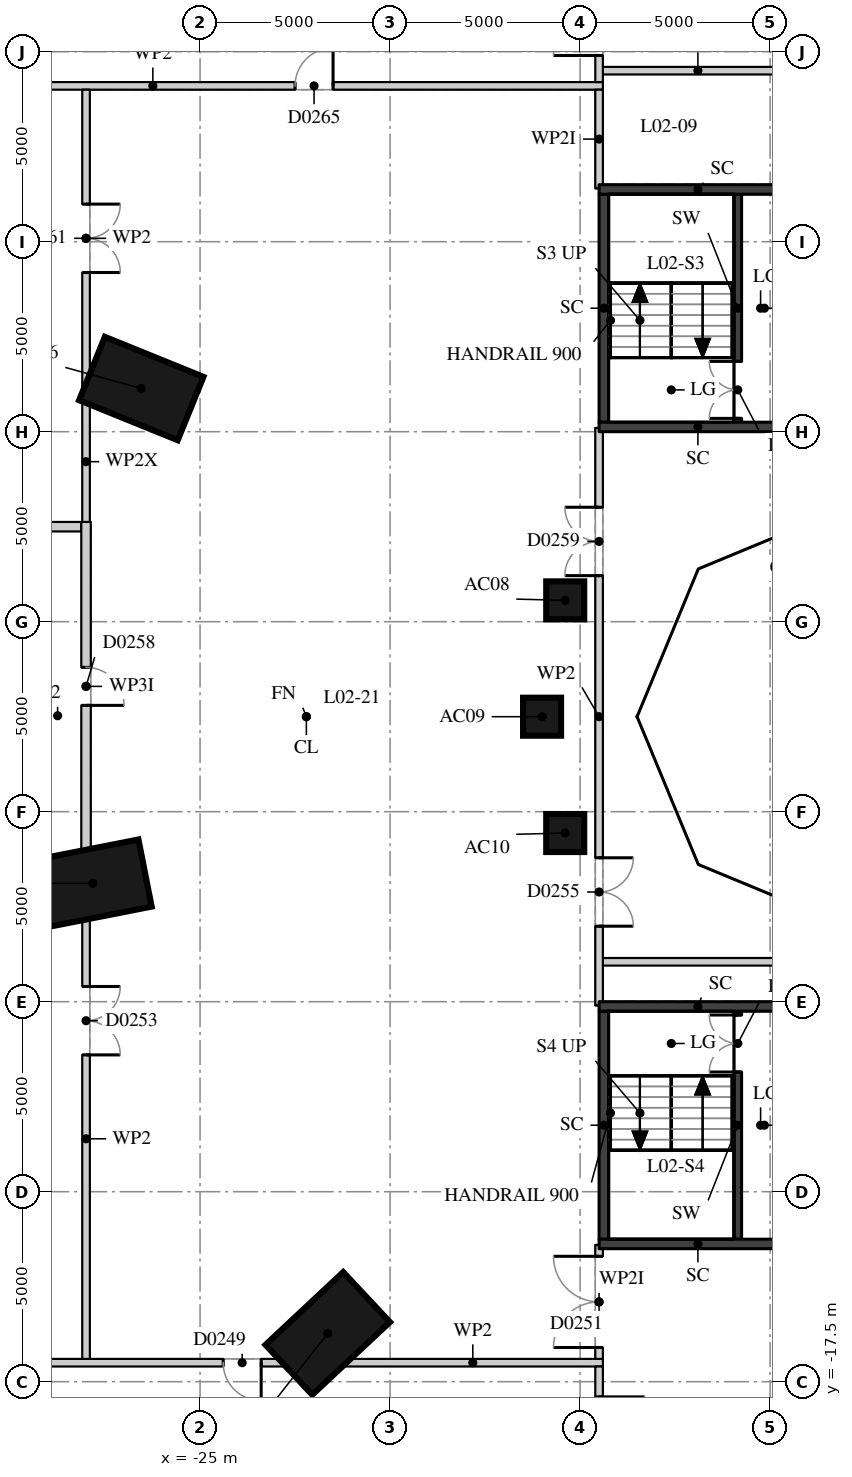
"""IFC4 building model, lengths in metres.
Left out: names, types, materials, properties, quantities, classifications, styles, units other than length and angle.
Written with IfcOpenShell. Run it as: python <this file> out.ifc"""

import sys

from ifc_helpers import new_model, si_unit, direction, frame, frame_2d, origin, origin_2d, place, context, subcontext, project, spatial, rectangle, extrude, element, fill, save


model = new_model("IFC4")
c1 = context("Model", 3, precision=1e-05, world=origin(), true_north=direction((0.0, 1.0)))
c2 = subcontext(c1, "Body", "Model", "MODEL_VIEW")
j1 = project(units=[si_unit("LENGTHUNIT", "METRE"), si_unit("PLANEANGLEUNIT", "RADIAN")], contexts=[c1])
p1 = place(None, origin())
s1 = spatial("IfcSite", under=j1, at=p1, CompositionType="ELEMENT")
p2 = place(p1, origin())
s2 = spatial("IfcBuilding", under=s1, at=p2, CompositionType="ELEMENT")
p3 = place(p2, frame((0.0, 0.0, 12.5)))
s3 = spatial("IfcBuildingStorey", under=s2, at=p3, CompositionType="ELEMENT", Elevation=12.5)
for number, where, z_axis, x_axis in (
    (1, (-26.546, 8.636, 0.0), (0.0, 0.0, 1.0), (-0.927, 0.376, 0.0)),
    (2, (-27.821, -4.385, 0.0), (0.0, 0.0, 1.0), (-0.981, -0.193, 0.0)),
    (3, (-21.641, -16.23, 0.0), (0.0, 0.0, 1.0), (-0.73, -0.683, 0.0)),
):
    element("IfcColumn", number, at=place(p3, frame(where, z_axis=z_axis, x_axis=x_axis)), inside=s3, PredefinedType="COLUMN", context=c2, shape_type="SweptSolid", body=[
        extrude(rectangle(XDim=2.8, YDim=1.8, at=origin_2d()), origin(), (0.0, 0.0, 1.0), 5.0),
    ])
for number, where, z_axis, x_axis in (
    (4, (-15.391, 3.062, 0.0), (0.0, 0.0, 1.0), (1.0, 0.0, 0.0)),
    (5, (-16.0, 0.0, 0.0), (0.0, 0.0, 1.0), (1.0, 0.0, 0.0)),
    (6, (-15.391, -3.062, 0.0), (0.0, 0.0, 1.0), (1.0, 0.0, 0.0)),
):
    element("IfcColumn", number, at=place(p3, frame(where, z_axis=z_axis, x_axis=x_axis)), inside=s3, PredefinedType="COLUMN", context=c2, shape_type="SweptSolid", body=[
        extrude(rectangle(XDim=1.0, YDim=1.0, at=origin_2d()), origin(), (0.0, 0.0, 1.0), 5.0),
    ])
p4 = place(p3, frame((-10.85, 7.75, 0.0), z_axis=(0.0, 0.0, 1.0), x_axis=(0.0, 1.0, 0.0)))
e7 = element("IfcWall", 7, at=p4, inside=s3, PredefinedType="SHEAR", context=c2, shape_type="SweptSolid", body=[
    extrude(rectangle(XDim=6.0, YDim=0.2, at=frame_2d((3.0, 0.0))), origin(), (0.0, 0.0, 1.0), 4.65),
])
p5 = place(p4, frame((0.1, 0.0, 0.0)))
e8 = element("IfcOpeningElement", 8, at=p5, cuts=e7, PredefinedType="OPENING", context=c2, shape_type="SweptSolid", body=[
    extrude(rectangle(XDim=1.5, YDim=2.1, at=frame_2d((0.75, 1.05))), frame((0.0, 0.11, 0.0), z_axis=(0.0, -1.0, 0.0), x_axis=(1.0, 0.0, 0.0)), (0.0, 0.0, 1.0), 0.22),
])
p6 = place(p3, frame((-10.85, -13.75, 0.0), z_axis=(0.0, 0.0, 1.0), x_axis=(0.0, 1.0, 0.0)))
e9 = element("IfcWall", 9, at=p6, inside=s3, PredefinedType="SHEAR", context=c2, shape_type="SweptSolid", body=[
    extrude(rectangle(XDim=6.0, YDim=0.2, at=frame_2d((3.0, 0.0))), origin(), (0.0, 0.0, 1.0), 4.65),
])
p7 = place(p6, frame((4.4, 0.0, 0.0)))
e10 = element("IfcOpeningElement", 10, at=p7, cuts=e9, PredefinedType="OPENING", context=c2, shape_type="SweptSolid", body=[
    extrude(rectangle(XDim=1.5, YDim=2.1, at=frame_2d((0.75, 1.05))), frame((0.0, 0.11, 0.0), z_axis=(0.0, -1.0, 0.0), x_axis=(1.0, 0.0, 0.0)), (0.0, 0.0, 1.0), 0.22),
])
p8 = place(p3, frame((-14.375, 7.75, -0.41), z_axis=(0.0, 0.0, 1.0), x_axis=(0.0, 1.0, 0.0)))
e11 = element("IfcWall", 11, at=p8, inside=s3, PredefinedType="SHEAR", context=c2, shape_type="SweptSolid", body=[
    extrude(rectangle(XDim=6.0, YDim=0.25, at=frame_2d((3.0, 0.0))), origin(), (0.0, 0.0, 1.0), 5.06),
])
for number, where, z_axis, x_axis in (
    (12, (-14.5, 13.875, -0.41), (0.0, 0.0, 1.0), (1.0, 0.0, 0.0)),
    (13, (-14.5, 7.625, -0.41), (0.0, 0.0, 1.0), (1.0, 0.0, 0.0)),
):
    element("IfcWall", number, at=place(p3, frame(where, z_axis=z_axis, x_axis=x_axis)), inside=s3, PredefinedType="SHEAR", context=c2, shape_type="SweptSolid", body=[
        extrude(rectangle(XDim=5.2, YDim=0.25, at=frame_2d((2.6, 0.0))), origin(), (0.0, 0.0, 1.0), 5.06),
    ])
p9 = place(p3, frame((-14.375, -13.75, -0.41), z_axis=(0.0, 0.0, 1.0), x_axis=(0.0, 1.0, 0.0)))
e14 = element("IfcWall", 14, at=p9, inside=s3, PredefinedType="SHEAR", context=c2, shape_type="SweptSolid", body=[
    extrude(rectangle(XDim=6.0, YDim=0.25, at=frame_2d((3.0, 0.0))), origin(), (0.0, 0.0, 1.0), 5.06),
])
for number, where, z_axis, x_axis in (
    (15, (-14.5, -7.625, -0.41), (0.0, 0.0, 1.0), (1.0, 0.0, 0.0)),
    (16, (-14.5, -13.875, -0.41), (0.0, 0.0, 1.0), (1.0, 0.0, 0.0)),
):
    element("IfcWall", number, at=place(p3, frame(where, z_axis=z_axis, x_axis=x_axis)), inside=s3, PredefinedType="SHEAR", context=c2, shape_type="SweptSolid", body=[
        extrude(rectangle(XDim=5.2, YDim=0.25, at=frame_2d((2.6, 0.0))), origin(), (0.0, 0.0, 1.0), 5.06),
    ])
p10 = place(p3, frame((-37.808, -17.0, 0.0), z_axis=(0.0, 0.0, 1.0), x_axis=(1.0, 0.0, 0.0)))
e17 = element("IfcWall", 17, at=p10, inside=s3, PredefinedType="PARTITIONING", context=c2, shape_type="SweptSolid", body=[
    extrude(rectangle(XDim=15.067, YDim=0.2, at=frame_2d((7.533, 0.0))), origin(), (0.0, 0.0, 1.0), 4.65),
])
p11 = place(p10, frame((4.354, 0.0, 0.0)))
e18 = element("IfcOpeningElement", 18, at=p11, cuts=e17, PredefinedType="OPENING", context=c2, shape_type="SweptSolid", body=[
    extrude(rectangle(XDim=1.0, YDim=2.1, at=frame_2d((0.5, 1.05))), frame((0.0, 0.11, 0.0), z_axis=(0.0, -1.0, 0.0), x_axis=(1.0, 0.0, 0.0)), (0.0, 0.0, 1.0), 0.22),
])
p12 = place(p10, frame((13.417, 0.0, 0.0)))
e19 = element("IfcOpeningElement", 19, at=p12, cuts=e17, PredefinedType="OPENING", context=c2, shape_type="SweptSolid", body=[
    extrude(rectangle(XDim=1.0, YDim=2.1, at=frame_2d((0.5, 1.05))), frame((0.0, 0.11, 0.0), z_axis=(0.0, -1.0, 0.0), x_axis=(1.0, 0.0, 0.0)), (0.0, 0.0, 1.0), 0.22),
])
p13 = place(p3, frame((-21.246, -17.0, 0.0), z_axis=(0.0, 0.0, 1.0), x_axis=(1.0, 0.0, 0.0)))
e20 = element("IfcWall", 20, at=p13, inside=s3, PredefinedType="PARTITIONING", context=c2, shape_type="SweptSolid", body=[
    extrude(rectangle(XDim=6.846, YDim=0.2, at=frame_2d((3.423, 0.0))), origin(), (0.0, 0.0, 1.0), 4.65),
])
p14 = place(p3, frame((-14.4, -6.45, 0.0), z_axis=(0.0, 0.0, 1.0), x_axis=(1.0, 0.0, 0.0)))
e21 = element("IfcWall", 21, at=p14, inside=s3, PredefinedType="PARTITIONING", context=c2, shape_type="SweptSolid", body=[
    extrude(rectangle(XDim=18.402, YDim=0.2, at=frame_2d((9.201, 0.0))), origin(), (0.0, 0.0, 1.0), 4.65),
])
p15 = place(p14, frame((8.001, 0.0, 0.0)))
e22 = element("IfcOpeningElement", 22, at=p15, cuts=e21, PredefinedType="OPENING", context=c2, shape_type="SweptSolid", body=[
    extrude(rectangle(XDim=2.4, YDim=2.4, at=frame_2d((1.2, 1.2))), frame((0.0, 0.11, 0.0), z_axis=(0.0, -1.0, 0.0), x_axis=(1.0, 0.0, 0.0)), (0.0, 0.0, 1.0), 0.22),
])
p16 = place(p3, frame((-43.205, 5.0, 0.0), z_axis=(0.0, 0.0, 1.0), x_axis=(1.0, 0.0, 0.0)))
e23 = element("IfcWall", 23, at=p16, inside=s3, PredefinedType="PARTITIONING", context=c2, shape_type="SweptSolid", body=[
    extrude(rectangle(XDim=15.08, YDim=0.25, at=frame_2d((7.54, 0.0))), origin(), (0.0, 0.0, 1.0), 3.65),
])
p17 = place(p3, frame((-38.084, 16.6, 0.0), z_axis=(0.0, 0.0, 1.0), x_axis=(1.0, 0.0, 0.0)))
e24 = element("IfcWall", 24, at=p17, inside=s3, PredefinedType="PARTITIONING", context=c2, shape_type="SweptSolid", body=[
    extrude(rectangle(XDim=23.685, YDim=0.2, at=frame_2d((11.842, 0.0))), origin(), (0.0, 0.0, 1.0), 4.65),
])
p18 = place(p17, frame((4.492, 0.0, 0.0)))
e25 = element("IfcOpeningElement", 25, at=p18, cuts=e24, PredefinedType="OPENING", context=c2, shape_type="SweptSolid", body=[
    extrude(rectangle(XDim=1.0, YDim=2.1, at=frame_2d((0.5, 1.05))), frame((0.0, 0.11, 0.0), z_axis=(0.0, -1.0, 0.0), x_axis=(1.0, 0.0, 0.0)), (0.0, 0.0, 1.0), 0.22),
])
p19 = place(p17, frame((15.584, 0.0, 0.0)))
e26 = element("IfcOpeningElement", 26, at=p19, cuts=e24, PredefinedType="OPENING", context=c2, shape_type="SweptSolid", body=[
    extrude(rectangle(XDim=1.0, YDim=2.1, at=frame_2d((0.5, 1.05))), frame((0.0, 0.11, 0.0), z_axis=(0.0, -1.0, 0.0), x_axis=(1.0, 0.0, 0.0)), (0.0, 0.0, 1.0), 0.22),
])
p20 = place(p3, frame((-14.4, 17.0, 0.0), z_axis=(0.0, 0.0, 1.0), x_axis=(1.0, 0.0, 0.0)))
e27 = element("IfcWall", 27, at=p20, inside=s3, PredefinedType="PARTITIONING", context=c2, shape_type="SweptSolid", body=[
    extrude(rectangle(XDim=5.0, YDim=0.2, at=frame_2d((2.5, 0.0))), origin(), (0.0, 0.0, 1.0), 4.65),
])
p21 = place(p3, frame((-28.0, -16.9, 0.0), z_axis=(0.0, 0.0, 1.0), x_axis=(0.0, 1.0, 0.0)))
e28 = element("IfcWall", 28, at=p21, inside=s3, PredefinedType="PARTITIONING", context=c2, shape_type="SweptSolid", body=[
    extrude(rectangle(XDim=11.584, YDim=0.2, at=frame_2d((5.792, 0.0))), origin(), (0.0, 0.0, 1.0), 4.65),
])
p22 = place(p21, frame((8.0, 0.0, 0.0)))
e29 = element("IfcOpeningElement", 29, at=p22, cuts=e28, PredefinedType="OPENING", context=c2, shape_type="SweptSolid", body=[
    extrude(rectangle(XDim=1.8, YDim=2.1, at=frame_2d((0.9, 1.05))), frame((0.0, 0.11, 0.0), z_axis=(0.0, -1.0, 0.0), x_axis=(1.0, 0.0, 0.0)), (0.0, 0.0, 1.0), 0.22),
])
p23 = place(p3, frame((-28.0, -3.529, 0.0), z_axis=(0.0, 0.0, 1.0), x_axis=(0.0, 1.0, 0.0)))
e30 = element("IfcWall", 30, at=p23, inside=s3, PredefinedType="PARTITIONING", context=c2, shape_type="SweptSolid", body=[
    extrude(rectangle(XDim=8.654, YDim=0.25, at=frame_2d((4.327, 0.0))), origin(), (0.0, 0.0, 1.0), 2.65),
])
p24 = place(p23, frame((3.827, 0.0, 0.0)))
e31 = element("IfcOpeningElement", 31, at=p24, cuts=e30, PredefinedType="OPENING", context=c2, shape_type="SweptSolid", body=[
    extrude(rectangle(XDim=1.0, YDim=2.1, at=frame_2d((0.5, 1.05))), frame((0.0, 0.135, 0.0), z_axis=(0.0, -1.0, 0.0), x_axis=(1.0, 0.0, 0.0)), (0.0, 0.0, 1.0), 0.27),
])
p25 = place(p3, frame((-28.0, 5.125, 0.0), z_axis=(0.0, 0.0, 1.0), x_axis=(0.0, 1.0, 0.0)))
e32 = element("IfcWall", 32, at=p25, inside=s3, PredefinedType="PARTITIONING", context=c2, shape_type="SweptSolid", body=[
    extrude(rectangle(XDim=3.173, YDim=0.2, at=frame_2d((1.586, 0.0))), origin(), (0.0, 0.0, 1.0), 2.65),
])
p26 = place(p3, frame((-28.0, 8.677, 0.0), z_axis=(0.0, 0.0, 1.0), x_axis=(0.0, 1.0, 0.0)))
e33 = element("IfcWall", 33, at=p26, inside=s3, PredefinedType="PARTITIONING", context=c2, shape_type="SweptSolid", body=[
    extrude(rectangle(XDim=7.823, YDim=0.2, at=frame_2d((3.912, 0.0))), origin(), (0.0, 0.0, 1.0), 4.65),
])
p27 = place(p26, frame((3.012, 0.0, 0.0)))
e34 = element("IfcOpeningElement", 34, at=p27, cuts=e33, PredefinedType="OPENING", context=c2, shape_type="SweptSolid", body=[
    extrude(rectangle(XDim=1.8, YDim=2.1, at=frame_2d((0.9, 1.05))), frame((0.0, 0.11, 0.0), z_axis=(0.0, -1.0, 0.0), x_axis=(1.0, 0.0, 0.0)), (0.0, 0.0, 1.0), 0.22),
])
p28 = place(p3, frame((-14.5, -31.803, 0.0), z_axis=(0.0, 0.0, 1.0), x_axis=(0.0, 1.0, 0.0)))
e35 = element("IfcWall", 35, at=p28, inside=s3, PredefinedType="PARTITIONING", context=c2, shape_type="SweptSolid", body=[
    extrude(rectangle(XDim=14.703, YDim=0.2, at=frame_2d((7.352, 0.0))), origin(), (0.0, 0.0, 1.0), 4.2),
])
p29 = place(p28, frame((7.303, 0.0, 0.0)))
e36 = element("IfcOpeningElement", 36, at=p29, cuts=e35, PredefinedType="OPENING", context=c2, shape_type="SweptSolid", body=[
    extrude(rectangle(XDim=1.0, YDim=2.1, at=frame_2d((0.5, 1.05))), frame((0.0, 0.11, 0.0), z_axis=(0.0, -1.0, 0.0), x_axis=(1.0, 0.0, 0.0)), (0.0, 0.0, 1.0), 0.22),
])
p30 = place(p28, frame((12.703, 0.0, 0.0)))
e37 = element("IfcOpeningElement", 37, at=p30, cuts=e35, PredefinedType="OPENING", context=c2, shape_type="SweptSolid", body=[
    extrude(rectangle(XDim=1.2, YDim=2.1, at=frame_2d((0.6, 1.05))), frame((0.0, 0.11, 0.0), z_axis=(0.0, -1.0, 0.0), x_axis=(1.0, 0.0, 0.0)), (0.0, 0.0, 1.0), 0.22),
])
p31 = place(p3, frame((-14.5, -16.9, 0.0), z_axis=(0.0, 0.0, 1.0), x_axis=(0.0, 1.0, 0.0)))
e38 = element("IfcWall", 38, at=p31, inside=s3, PredefinedType="PARTITIONING", context=c2, shape_type="SweptSolid", body=[
    extrude(rectangle(XDim=3.0, YDim=0.2, at=frame_2d((1.5, 0.0))), origin(), (0.0, 0.0, 1.0), 4.2),
])
p32 = place(p31, frame((0.3, 0.0, 0.0)))
e39 = element("IfcOpeningElement", 39, at=p32, cuts=e38, PredefinedType="OPENING", context=c2, shape_type="SweptSolid", body=[
    extrude(rectangle(XDim=2.4, YDim=2.4, at=frame_2d((1.2, 1.2))), frame((0.0, 0.11, 0.0), z_axis=(0.0, -1.0, 0.0), x_axis=(1.0, 0.0, 0.0)), (0.0, 0.0, 1.0), 0.22),
])
p33 = place(p3, frame((-14.5, -7.6, 0.0), z_axis=(0.0, 0.0, 1.0), x_axis=(0.0, 1.0, 0.0)))
e40 = element("IfcWall", 40, at=p33, inside=s3, PredefinedType="PARTITIONING", context=c2, shape_type="SweptSolid", body=[
    extrude(rectangle(XDim=15.2, YDim=0.2, at=frame_2d((7.6, 0.0))), origin(), (0.0, 0.0, 1.0), 4.65),
])
p34 = place(p33, frame((2.087, 0.0, 0.0)))
e41 = element("IfcOpeningElement", 41, at=p34, cuts=e40, PredefinedType="OPENING", context=c2, shape_type="SweptSolid", body=[
    extrude(rectangle(XDim=1.8, YDim=2.4, at=frame_2d((0.9, 1.2))), frame((0.0, 0.11, 0.0), z_axis=(0.0, -1.0, 0.0), x_axis=(1.0, 0.0, 0.0)), (0.0, 0.0, 1.0), 0.22),
])
p35 = place(p33, frame((11.312, 0.0, 0.0)))
e42 = element("IfcOpeningElement", 42, at=p35, cuts=e40, PredefinedType="OPENING", context=c2, shape_type="SweptSolid", body=[
    extrude(rectangle(XDim=1.8, YDim=2.4, at=frame_2d((0.9, 1.2))), frame((0.0, 0.11, 0.0), z_axis=(0.0, -1.0, 0.0), x_axis=(1.0, 0.0, 0.0)), (0.0, 0.0, 1.0), 0.22),
])
p36 = place(p3, frame((-14.5, 13.9, 0.0), z_axis=(0.0, 0.0, 1.0), x_axis=(0.0, 1.0, 0.0)))
e43 = element("IfcWall", 43, at=p36, inside=s3, PredefinedType="PARTITIONING", context=c2, shape_type="SweptSolid", body=[
    extrude(rectangle(XDim=2.6, YDim=0.2, at=frame_2d((1.3, 0.0))), origin(), (0.0, 0.0, 1.0), 4.2),
])
p37 = place(p3, frame((-14.5, 16.7, 0.0), z_axis=(0.0, 0.0, 1.0), x_axis=(0.0, 1.0, 0.0)))
e44 = element("IfcWall", 44, at=p37, inside=s3, PredefinedType="PARTITIONING", context=c2, shape_type="SweptSolid", body=[
    extrude(rectangle(XDim=15.103, YDim=0.2, at=frame_2d((7.552, 0.0))), origin(), (0.0, 0.0, 1.0), 4.2),
])
p38 = place(p37, frame((0.7, 0.0, 0.0)))
e45 = element("IfcOpeningElement", 45, at=p38, cuts=e44, PredefinedType="OPENING", context=c2, shape_type="SweptSolid", body=[
    extrude(rectangle(XDim=1.2, YDim=2.1, at=frame_2d((0.6, 1.05))), frame((0.0, 0.11, 0.0), z_axis=(0.0, -1.0, 0.0), x_axis=(1.0, 0.0, 0.0)), (0.0, 0.0, 1.0), 0.22),
])
p39 = place(p5, origin())
e46 = element("IfcDoor", 46, at=p39, inside=s3, OperationType="DOUBLE_DOOR_SINGLE_SWING", PredefinedType="DOOR", context=c2, shape_type="SweptSolid", body=[
    extrude(rectangle(XDim=1.5, YDim=2.1, at=frame_2d((0.75, 1.05))), frame((0.0, 0.025, 0.0), z_axis=(0.0, -1.0, 0.0), x_axis=(1.0, 0.0, 0.0)), (0.0, 0.0, 1.0), 0.05),
])
fill(e8, e46)
p40 = place(p7, origin())
e47 = element("IfcDoor", 47, at=p40, inside=s3, OperationType="DOUBLE_DOOR_SINGLE_SWING", PredefinedType="DOOR", context=c2, shape_type="SweptSolid", body=[
    extrude(rectangle(XDim=1.5, YDim=2.1, at=frame_2d((0.75, 1.05))), frame((0.0, 0.025, 0.0), z_axis=(0.0, -1.0, 0.0), x_axis=(1.0, 0.0, 0.0)), (0.0, 0.0, 1.0), 0.05),
])
fill(e10, e47)
p41 = place(p34, origin())
e48 = element("IfcDoor", 48, at=p41, inside=s3, OperationType="DOUBLE_DOOR_SINGLE_SWING", PredefinedType="DOOR", context=c2, shape_type="SweptSolid", body=[
    extrude(rectangle(XDim=1.8, YDim=2.4, at=frame_2d((0.9, 1.2))), frame((0.0, 0.025, 0.0), z_axis=(0.0, -1.0, 0.0), x_axis=(1.0, 0.0, 0.0)), (0.0, 0.0, 1.0), 0.05),
])
fill(e41, e48)
p42 = place(p35, origin())
e49 = element("IfcDoor", 49, at=p42, inside=s3, OperationType="DOUBLE_DOOR_SINGLE_SWING", PredefinedType="DOOR", context=c2, shape_type="SweptSolid", body=[
    extrude(rectangle(XDim=1.8, YDim=2.4, at=frame_2d((0.9, 1.2))), frame((0.0, 0.025, 0.0), z_axis=(0.0, -1.0, 0.0), x_axis=(1.0, 0.0, 0.0)), (0.0, 0.0, 1.0), 0.05),
])
fill(e42, e49)
p43 = place(p32, origin())
e50 = element("IfcDoor", 50, at=p43, inside=s3, OperationType="DOUBLE_DOOR_SINGLE_SWING", PredefinedType="DOOR", context=c2, shape_type="SweptSolid", body=[
    extrude(rectangle(XDim=2.4, YDim=2.4, at=frame_2d((1.2, 1.2))), frame((0.0, 0.025, 0.0), z_axis=(0.0, -1.0, 0.0), x_axis=(1.0, 0.0, 0.0)), (0.0, 0.0, 1.0), 0.05),
])
fill(e39, e50)
p44 = place(p22, origin())
e51 = element("IfcDoor", 51, at=p44, inside=s3, OperationType="DOUBLE_DOOR_SINGLE_SWING", PredefinedType="DOOR", context=c2, shape_type="SweptSolid", body=[
    extrude(rectangle(XDim=1.8, YDim=2.1, at=frame_2d((0.9, 1.05))), frame((0.0, 0.025, 0.0), z_axis=(0.0, -1.0, 0.0), x_axis=(1.0, 0.0, 0.0)), (0.0, 0.0, 1.0), 0.05),
])
fill(e29, e51)
p45 = place(p27, origin())
e52 = element("IfcDoor", 52, at=p45, inside=s3, OperationType="DOUBLE_DOOR_SINGLE_SWING", PredefinedType="DOOR", context=c2, shape_type="SweptSolid", body=[
    extrude(rectangle(XDim=1.8, YDim=2.1, at=frame_2d((0.9, 1.05))), frame((0.0, 0.025, 0.0), z_axis=(0.0, -1.0, 0.0), x_axis=(1.0, 0.0, 0.0)), (0.0, 0.0, 1.0), 0.05),
])
fill(e34, e52)
p46 = place(p24, origin())
e53 = element("IfcDoor", 53, at=p46, inside=s3, OperationType="SINGLE_SWING_RIGHT", PredefinedType="DOOR", context=c2, shape_type="SweptSolid", body=[
    extrude(rectangle(XDim=1.0, YDim=2.1, at=frame_2d((0.5, 1.05))), frame((0.0, 0.025, 0.0), z_axis=(0.0, -1.0, 0.0), x_axis=(1.0, 0.0, 0.0)), (0.0, 0.0, 1.0), 0.05),
])
fill(e31, e53)
p47 = place(p19, origin())
e54 = element("IfcDoor", 54, at=p47, inside=s3, OperationType="SINGLE_SWING_RIGHT", PredefinedType="DOOR", context=c2, shape_type="SweptSolid", body=[
    extrude(rectangle(XDim=1.0, YDim=2.1, at=frame_2d((0.5, 1.05))), frame((0.0, 0.025, 0.0), z_axis=(0.0, -1.0, 0.0), x_axis=(1.0, 0.0, 0.0)), (0.0, 0.0, 1.0), 0.05),
])
fill(e26, e54)
p48 = place(p12, origin())
e55 = element("IfcDoor", 55, at=p48, inside=s3, OperationType="SINGLE_SWING_LEFT", PredefinedType="DOOR", context=c2, shape_type="SweptSolid", body=[
    extrude(rectangle(XDim=1.0, YDim=2.1, at=frame_2d((0.5, 1.05))), frame((0.0, 0.025, 0.0), z_axis=(0.0, -1.0, 0.0), x_axis=(1.0, 0.0, 0.0)), (0.0, 0.0, 1.0), 0.05),
])
fill(e19, e55)
p49 = place(p38, origin())
e56 = element("IfcDoor", 56, at=p49, inside=s3, OperationType="SINGLE_SWING_LEFT", PredefinedType="DOOR", context=c2, shape_type="SweptSolid", body=[
    extrude(rectangle(XDim=1.2, YDim=2.1, at=frame_2d((0.6, 1.05))), frame((0.0, 0.025, 0.0), z_axis=(0.0, -1.0, 0.0), x_axis=(1.0, 0.0, 0.0)), (0.0, 0.0, 1.0), 0.05),
])
fill(e45, e56)
p50 = place(p30, origin())
e57 = element("IfcDoor", 57, at=p50, inside=s3, OperationType="SINGLE_SWING_LEFT", PredefinedType="DOOR", context=c2, shape_type="SweptSolid", body=[
    extrude(rectangle(XDim=1.2, YDim=2.1, at=frame_2d((0.6, 1.05))), frame((0.0, 0.025, 0.0), z_axis=(0.0, -1.0, 0.0), x_axis=(1.0, 0.0, 0.0)), (0.0, 0.0, 1.0), 0.05),
])
fill(e37, e57)
save(model, sys.argv[1])
